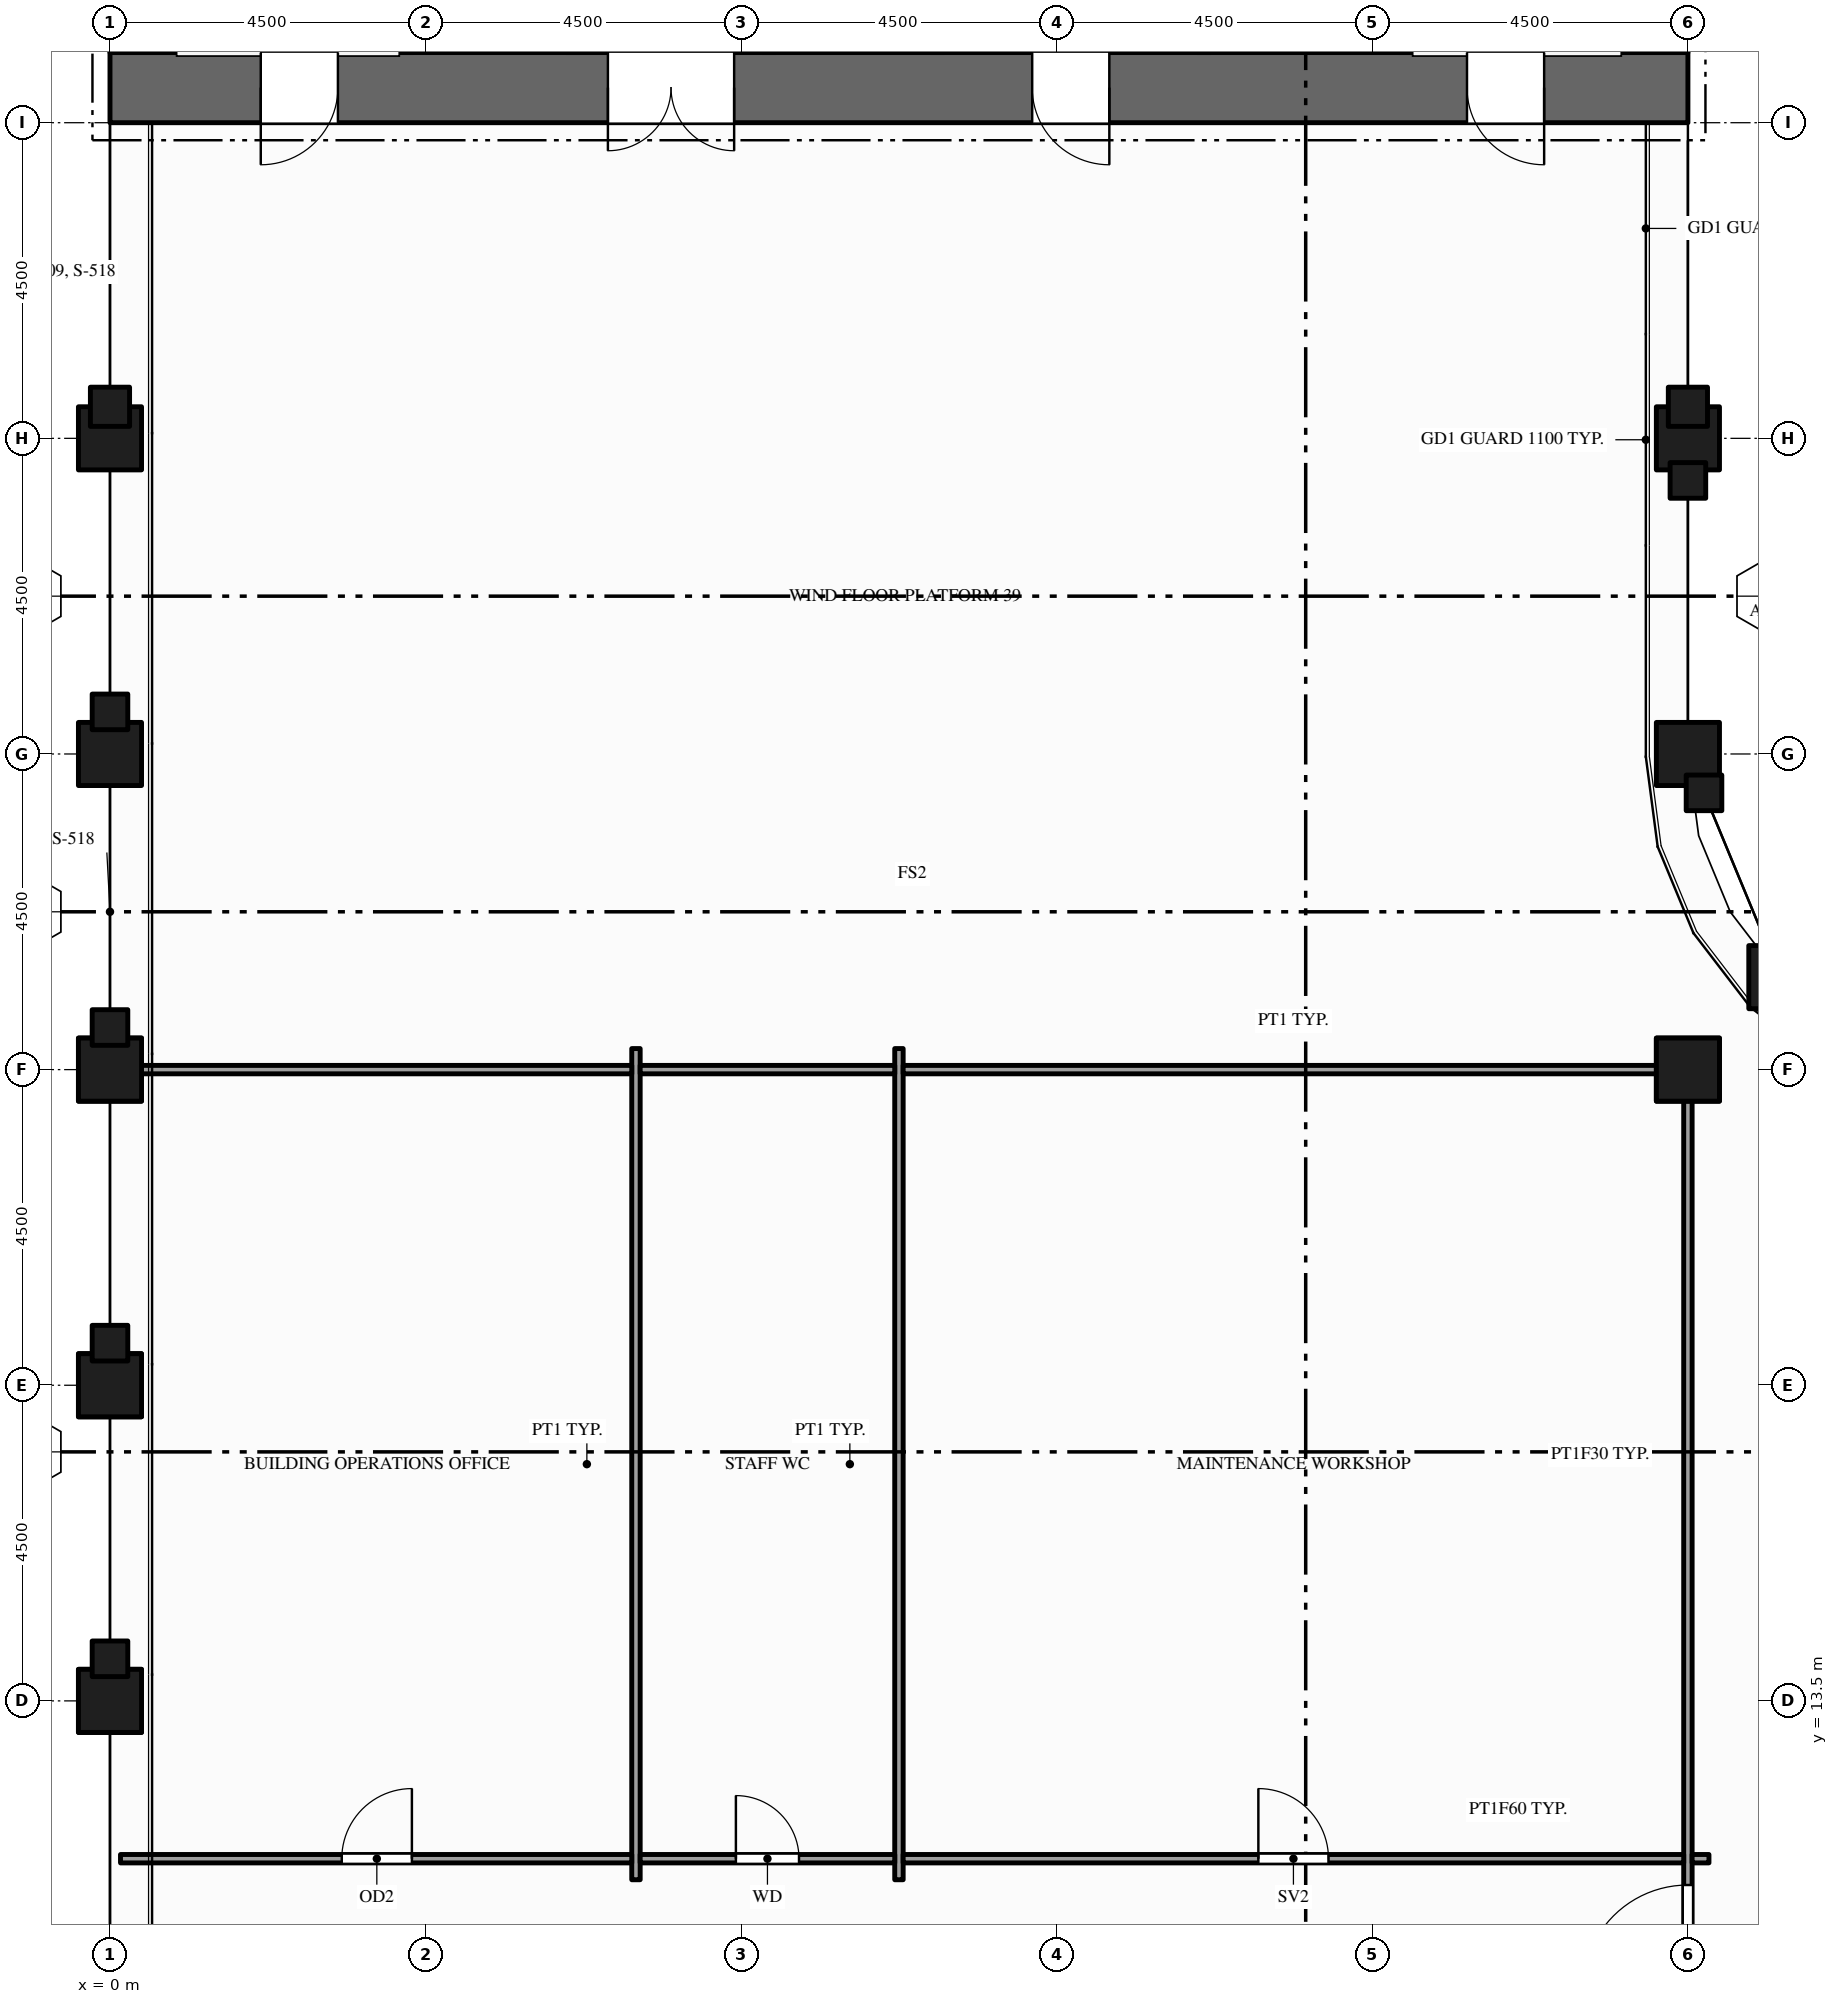
"""IFC4 building model, lengths in metres.
Left out: names, types, materials, properties, quantities, classifications, styles, units other than length and angle.
Written with IfcOpenShell. Run it as: python <this file> out.ifc"""

import sys

from ifc_helpers import new_model, si_unit, direction, frame, frame_2d, origin, origin_2d, place, context, subcontext, project, spatial, rectangle, hollow_rectangle, extrude, element, fill, save


model = new_model("IFC4")
c1 = context("Model", 3, precision=1e-05, world=origin(), true_north=direction((0.0, 1.0)))
c2 = subcontext(c1, "Body", "Model", "MODEL_VIEW")
j1 = project(units=[si_unit("LENGTHUNIT", "METRE"), si_unit("PLANEANGLEUNIT", "RADIAN")], contexts=[c1])
p1 = place(None, origin())
s1 = spatial("IfcSite", under=j1, at=p1, CompositionType="ELEMENT")
p2 = place(p1, origin())
s2 = spatial("IfcBuilding", under=s1, at=p2, CompositionType="ELEMENT")
p3 = place(p2, frame((0.0, 0.0, 187.0)))
s3 = spatial("IfcBuildingStorey", under=s2, at=p3, CompositionType="ELEMENT", Elevation=187.0)
p4 = place(p3, frame((0.0, 36.5, -0.15), z_axis=(0.0, 0.0, 1.0), x_axis=(1.0, 0.0, 0.0)))
e1 = element("IfcWall", 1, at=p4, inside=s3, PredefinedType="SHEAR", context=c2, shape_type="SweptSolid", body=[
    extrude(rectangle(XDim=22.5, YDim=1.0, at=frame_2d((11.25, 0.0))), origin(), (0.0, 0.0, 1.0), 8.0),
])
p5 = place(p4, frame((7.1, 0.0, 0.15)))
e2 = element("IfcOpeningElement", 2, at=p5, cuts=e1, PredefinedType="OPENING", context=c2, shape_type="SweptSolid", body=[
    extrude(rectangle(XDim=1.8, YDim=2.1, at=frame_2d((0.9, 1.05))), frame((0.0, 0.51, 0.0), z_axis=(0.0, -1.0, 0.0), x_axis=(1.0, 0.0, 0.0)), (0.0, 0.0, 1.0), 1.02),
])
p6 = place(p4, frame((13.15, 0.0, 0.15)))
e3 = element("IfcOpeningElement", 3, at=p6, cuts=e1, PredefinedType="OPENING", context=c2, shape_type="SweptSolid", body=[
    extrude(rectangle(XDim=1.1, YDim=2.1, at=frame_2d((0.55, 1.05))), frame((0.0, 0.51, 0.0), z_axis=(0.0, -1.0, 0.0), x_axis=(1.0, 0.0, 0.0)), (0.0, 0.0, 1.0), 1.02),
])
p7 = place(p4, frame((2.15, 0.0, 0.15)))
e4 = element("IfcOpeningElement", 4, at=p7, cuts=e1, PredefinedType="OPENING", context=c2, shape_type="SweptSolid", body=[
    extrude(rectangle(XDim=1.1, YDim=2.1, at=frame_2d((0.55, 1.05))), frame((0.0, 0.51, 0.0), z_axis=(0.0, -1.0, 0.0), x_axis=(1.0, 0.0, 0.0)), (0.0, 0.0, 1.0), 1.02),
])
p8 = place(p4, frame((19.35, 0.0, 0.15)))
e5 = element("IfcOpeningElement", 5, at=p8, cuts=e1, PredefinedType="OPENING", context=c2, shape_type="SweptSolid", body=[
    extrude(rectangle(XDim=1.1, YDim=2.1, at=frame_2d((0.55, 1.05))), frame((0.0, 0.51, 0.0), z_axis=(0.0, -1.0, 0.0), x_axis=(1.0, 0.0, 0.0)), (0.0, 0.0, 1.0), 1.02),
])
p9 = place(p3, frame((0.0, 13.5, -0.25), z_axis=(0.0, 0.0, 1.0), x_axis=(1.0, 0.0, 0.0)))
e6 = element("IfcColumn", 6, at=p9, inside=s3, PredefinedType="COLUMN", context=c2, shape_type="SweptSolid", body=[
    extrude(hollow_rectangle(XDim=0.9, YDim=0.9, WallThickness=0.045, at=origin_2d()), origin(), (0.0, 0.0, 1.0), 6.6),
])
p10 = place(p3, frame((0.0, 13.5, 6.35), z_axis=(0.0, 0.0, 1.0), x_axis=(1.0, 0.0, 0.0)))
e7 = element("IfcColumn", 7, at=p10, inside=s3, PredefinedType="COLUMN", context=c2, shape_type="SweptSolid", body=[
    extrude(rectangle(XDim=0.9, YDim=0.9, at=origin_2d()), origin(), (0.0, 0.0, 1.0), 1.5),
])
p11 = place(p3, frame((0.0, 18.0, -0.25), z_axis=(0.0, 0.0, 1.0), x_axis=(1.0, 0.0, 0.0)))
e8 = element("IfcColumn", 8, at=p11, inside=s3, PredefinedType="COLUMN", context=c2, shape_type="SweptSolid", body=[
    extrude(hollow_rectangle(XDim=0.9, YDim=0.9, WallThickness=0.045, at=origin_2d()), origin(), (0.0, 0.0, 1.0), 6.6),
])
p12 = place(p3, frame((0.0, 18.0, 6.35), z_axis=(0.0, 0.0, 1.0), x_axis=(1.0, 0.0, 0.0)))
e9 = element("IfcColumn", 9, at=p12, inside=s3, PredefinedType="COLUMN", context=c2, shape_type="SweptSolid", body=[
    extrude(rectangle(XDim=0.9, YDim=0.9, at=origin_2d()), origin(), (0.0, 0.0, 1.0), 1.5),
])
p13 = place(p3, frame((0.0, 22.5, -0.25), z_axis=(0.0, 0.0, 1.0), x_axis=(1.0, 0.0, 0.0)))
e10 = element("IfcColumn", 10, at=p13, inside=s3, PredefinedType="COLUMN", context=c2, shape_type="SweptSolid", body=[
    extrude(hollow_rectangle(XDim=0.9, YDim=0.9, WallThickness=0.045, at=origin_2d()), origin(), (0.0, 0.0, 1.0), 6.6),
])
p14 = place(p3, frame((0.0, 22.5, 6.35), z_axis=(0.0, 0.0, 1.0), x_axis=(1.0, 0.0, 0.0)))
e11 = element("IfcColumn", 11, at=p14, inside=s3, PredefinedType="COLUMN", context=c2, shape_type="SweptSolid", body=[
    extrude(rectangle(XDim=0.9, YDim=0.9, at=origin_2d()), origin(), (0.0, 0.0, 1.0), 1.5),
])
for number, where, z_axis, x_axis in (
    (12, (0.0, 27.0, -0.25), (0.0, 0.0, 1.0), (1.0, 0.0, 0.0)),
    (13, (0.0, 31.5, -0.25), (0.0, 0.0, 1.0), (1.0, 0.0, 0.0)),
):
    element("IfcColumn", number, at=place(p3, frame(where, z_axis=z_axis, x_axis=x_axis)), inside=s3, PredefinedType="COLUMN", context=c2, shape_type="SweptSolid", body=[
        extrude(hollow_rectangle(XDim=0.9, YDim=0.9, WallThickness=0.045, at=origin_2d()), origin(), (0.0, 0.0, 1.0), 8.1),
    ])
p15 = place(p3, frame((22.5, 22.5, -0.25), z_axis=(0.0, 0.0, 1.0), x_axis=(1.0, 0.0, 0.0)))
e14 = element("IfcColumn", 14, at=p15, inside=s3, PredefinedType="COLUMN", context=c2, shape_type="SweptSolid", body=[
    extrude(hollow_rectangle(XDim=0.9, YDim=0.9, WallThickness=0.045, at=origin_2d()), origin(), (0.0, 0.0, 1.0), 6.6),
])
p16 = place(p3, frame((22.5, 22.5, 6.35), z_axis=(0.0, 0.0, 1.0), x_axis=(1.0, 0.0, 0.0)))
e15 = element("IfcColumn", 15, at=p16, inside=s3, PredefinedType="COLUMN", context=c2, shape_type="SweptSolid", body=[
    extrude(rectangle(XDim=0.9, YDim=0.9, at=origin_2d()), origin(), (0.0, 0.0, 1.0), 1.5),
])
for number, where, z_axis, x_axis in (
    (16, (22.5, 27.0, -0.25), (0.0, 0.0, 1.0), (1.0, 0.0, 0.0)),
    (17, (22.5, 31.5, -0.25), (0.0, 0.0, 1.0), (1.0, 0.0, 0.0)),
    (18, (23.818, 23.818, -0.25), (0.0, 0.0, 1.0), (1.0, 0.0, 0.0)),
):
    element("IfcColumn", number, at=place(p3, frame(where, z_axis=z_axis, x_axis=x_axis)), inside=s3, PredefinedType="COLUMN", context=c2, shape_type="SweptSolid", body=[
        extrude(hollow_rectangle(XDim=0.9, YDim=0.9, WallThickness=0.045, at=origin_2d()), origin(), (0.0, 0.0, 1.0), 8.1),
    ])
for number, where, z_axis, x_axis in (
    (19, (7.5, 10.95, 0.0), (0.0, 0.0, 1.0), (0.0, 1.0, 0.0)),
    (20, (11.25, 10.95, 0.0), (0.0, 0.0, 1.0), (0.0, 1.0, 0.0)),
):
    element("IfcWall", number, at=place(p3, frame(where, z_axis=z_axis, x_axis=x_axis)), inside=s3, PredefinedType="PARTITIONING", context=c2, shape_type="SweptSolid", body=[
        extrude(rectangle(XDim=11.85, YDim=0.12, at=frame_2d((5.925, 0.0))), origin(), (0.0, 0.0, 1.0), 6.6),
    ])
p17 = place(p3, frame((22.5, 0.15, 0.0), z_axis=(0.0, 0.0, 1.0), x_axis=(0.0, 1.0, 0.0)))
e21 = element("IfcWall", 21, at=p17, inside=s3, PredefinedType="PARTITIONING", context=c2, shape_type="SweptSolid", body=[
    extrude(rectangle(XDim=22.65, YDim=0.12, at=frame_2d((11.325, 0.0))), origin(), (0.0, 0.0, 1.0), 6.87),
])
p18 = place(p17, frame((9.225, 0.0, 0.0)))
e22 = element("IfcOpeningElement", 22, at=p18, cuts=e21, PredefinedType="OPENING", context=c2, shape_type="SweptSolid", body=[
    extrude(rectangle(XDim=1.5, YDim=2.1, at=frame_2d((0.75, 1.05))), frame((0.0, 0.07, 0.0), z_axis=(0.0, -1.0, 0.0), x_axis=(1.0, 0.0, 0.0)), (0.0, 0.0, 1.0), 0.14),
])
p19 = place(p3, frame((0.15, 11.25, 0.0), z_axis=(0.0, 0.0, 1.0), x_axis=(1.0, 0.0, 0.0)))
e23 = element("IfcWall", 23, at=p19, inside=s3, PredefinedType="PARTITIONING", context=c2, shape_type="SweptSolid", body=[
    extrude(rectangle(XDim=7.29, YDim=0.12, at=frame_2d((3.645, 0.0))), origin(), (0.0, 0.0, 1.0), 6.87),
])
p20 = place(p19, frame((3.155, 0.0, 0.0)))
e24 = element("IfcOpeningElement", 24, at=p20, cuts=e23, PredefinedType="OPENING", context=c2, shape_type="SweptSolid", body=[
    extrude(rectangle(XDim=1.0, YDim=2.1, at=frame_2d((0.5, 1.05))), frame((0.0, 0.07, 0.0), z_axis=(0.0, -1.0, 0.0), x_axis=(1.0, 0.0, 0.0)), (0.0, 0.0, 1.0), 0.14),
])
p21 = place(p3, frame((7.56, 11.25, 0.0), z_axis=(0.0, 0.0, 1.0), x_axis=(1.0, 0.0, 0.0)))
e25 = element("IfcWall", 25, at=p21, inside=s3, PredefinedType="PARTITIONING", context=c2, shape_type="SweptSolid", body=[
    extrude(rectangle(XDim=3.63, YDim=0.12, at=frame_2d((1.815, 0.0))), origin(), (0.0, 0.0, 1.0), 6.87),
])
p22 = place(p21, frame((1.365, 0.0, 0.0)))
e26 = element("IfcOpeningElement", 26, at=p22, cuts=e25, PredefinedType="OPENING", context=c2, shape_type="SweptSolid", body=[
    extrude(rectangle(XDim=0.9, YDim=2.1, at=frame_2d((0.45, 1.05))), frame((0.0, 0.07, 0.0), z_axis=(0.0, -1.0, 0.0), x_axis=(1.0, 0.0, 0.0)), (0.0, 0.0, 1.0), 0.14),
])
p23 = place(p3, frame((11.31, 11.25, 0.0), z_axis=(0.0, 0.0, 1.0), x_axis=(1.0, 0.0, 0.0)))
e27 = element("IfcWall", 27, at=p23, inside=s3, PredefinedType="PARTITIONING", context=c2, shape_type="SweptSolid", body=[
    extrude(rectangle(XDim=11.13, YDim=0.12, at=frame_2d((5.565, 0.0))), origin(), (0.0, 0.0, 1.0), 6.87),
])
p24 = place(p23, frame((5.065, 0.0, 0.0)))
e28 = element("IfcOpeningElement", 28, at=p24, cuts=e27, PredefinedType="OPENING", context=c2, shape_type="SweptSolid", body=[
    extrude(rectangle(XDim=1.0, YDim=2.1, at=frame_2d((0.5, 1.05))), frame((0.0, 0.07, 0.0), z_axis=(0.0, -1.0, 0.0), x_axis=(1.0, 0.0, 0.0)), (0.0, 0.0, 1.0), 0.14),
])
p25 = place(p3, frame((22.56, 11.25, 0.0), z_axis=(0.0, 0.0, 1.0), x_axis=(1.0, 0.0, 0.0)))
e29 = element("IfcWall", 29, at=p25, inside=s3, PredefinedType="PARTITIONING", context=c2, shape_type="SweptSolid", body=[
    extrude(rectangle(XDim=0.24, YDim=0.12, at=frame_2d((0.12, 0.0))), origin(), (0.0, 0.0, 1.0), 6.87),
])
p26 = place(p3, frame((0.15, 22.5, 0.0), z_axis=(0.0, 0.0, 1.0), x_axis=(1.0, 0.0, 0.0)))
e30 = element("IfcWall", 30, at=p26, inside=s3, PredefinedType="PARTITIONING", context=c2, shape_type="SweptSolid", body=[
    extrude(rectangle(XDim=7.29, YDim=0.12, at=frame_2d((3.645, 0.0))), origin(), (0.0, 0.0, 1.0), 6.45),
])
p27 = place(p3, frame((7.56, 22.5, 0.0), z_axis=(0.0, 0.0, 1.0), x_axis=(1.0, 0.0, 0.0)))
e31 = element("IfcWall", 31, at=p27, inside=s3, PredefinedType="PARTITIONING", context=c2, shape_type="SweptSolid", body=[
    extrude(rectangle(XDim=3.63, YDim=0.12, at=frame_2d((1.815, 0.0))), origin(), (0.0, 0.0, 1.0), 6.6),
])
p28 = place(p3, frame((11.31, 22.5, 0.0), z_axis=(0.0, 0.0, 1.0), x_axis=(1.0, 0.0, 0.0)))
e32 = element("IfcWall", 32, at=p28, inside=s3, PredefinedType="PARTITIONING", context=c2, shape_type="SweptSolid", body=[
    extrude(rectangle(XDim=11.13, YDim=0.12, at=frame_2d((5.565, 0.0))), origin(), (0.0, 0.0, 1.0), 6.6),
])
p29 = place(p3, frame((22.56, 22.5, 0.0), z_axis=(0.0, 0.0, 1.0), x_axis=(1.0, 0.0, 0.0)))
e33 = element("IfcWall", 33, at=p29, inside=s3, PredefinedType="PARTITIONING", context=c2, shape_type="SweptSolid", body=[
    extrude(rectangle(XDim=0.24, YDim=0.12, at=frame_2d((0.12, 0.0))), origin(), (0.0, 0.0, 1.0), 7.85),
])
p30 = place(p5, origin())
e34 = element("IfcDoor", 34, at=p30, inside=s3, OperationType="DOUBLE_DOOR_SINGLE_SWING", PredefinedType="DOOR", context=c2, shape_type="SweptSolid", body=[
    extrude(rectangle(XDim=1.8, YDim=2.1, at=frame_2d((0.9, 1.05))), frame((0.0, 0.025, 0.0), z_axis=(0.0, -1.0, 0.0), x_axis=(1.0, 0.0, 0.0)), (0.0, 0.0, 1.0), 0.05),
])
fill(e2, e34)
p31 = place(p6, origin())
e35 = element("IfcDoor", 35, at=p31, inside=s3, OperationType="SINGLE_SWING_RIGHT", PredefinedType="DOOR", context=c2, shape_type="SweptSolid", body=[
    extrude(rectangle(XDim=1.1, YDim=2.1, at=frame_2d((0.55, 1.05))), frame((0.0, 0.025, 0.0), z_axis=(0.0, -1.0, 0.0), x_axis=(1.0, 0.0, 0.0)), (0.0, 0.0, 1.0), 0.05),
])
fill(e3, e35)
p32 = place(p7, origin())
e36 = element("IfcDoor", 36, at=p32, inside=s3, OperationType="SINGLE_SWING_LEFT", PredefinedType="DOOR", context=c2, shape_type="SweptSolid", body=[
    extrude(rectangle(XDim=1.1, YDim=2.1, at=frame_2d((0.55, 1.05))), frame((0.0, 0.025, 0.0), z_axis=(0.0, -1.0, 0.0), x_axis=(1.0, 0.0, 0.0)), (0.0, 0.0, 1.0), 0.05),
])
fill(e4, e36)
p33 = place(p8, origin())
e37 = element("IfcDoor", 37, at=p33, inside=s3, OperationType="SINGLE_SWING_RIGHT", PredefinedType="DOOR", context=c2, shape_type="SweptSolid", body=[
    extrude(rectangle(XDim=1.1, YDim=2.1, at=frame_2d((0.55, 1.05))), frame((0.0, 0.025, 0.0), z_axis=(0.0, -1.0, 0.0), x_axis=(1.0, 0.0, 0.0)), (0.0, 0.0, 1.0), 0.05),
])
fill(e5, e37)
p34 = place(p22, origin())
e38 = element("IfcDoor", 38, at=p34, inside=s3, OperationType="SINGLE_SWING_LEFT", PredefinedType="DOOR", context=c2, shape_type="SweptSolid", body=[
    extrude(rectangle(XDim=0.9, YDim=2.1, at=frame_2d((0.45, 1.05))), frame((0.0, 0.025, 0.0), z_axis=(0.0, -1.0, 0.0), x_axis=(1.0, 0.0, 0.0)), (0.0, 0.0, 1.0), 0.05),
])
fill(e26, e38)
p35 = place(p20, origin())
e39 = element("IfcDoor", 39, at=p35, inside=s3, OperationType="SINGLE_SWING_RIGHT", PredefinedType="DOOR", context=c2, shape_type="SweptSolid", body=[
    extrude(rectangle(XDim=1.0, YDim=2.1, at=frame_2d((0.5, 1.05))), frame((0.0, 0.025, 0.0), z_axis=(0.0, -1.0, 0.0), x_axis=(1.0, 0.0, 0.0)), (0.0, 0.0, 1.0), 0.05),
])
fill(e24, e39)
p36 = place(p24, origin())
e40 = element("IfcDoor", 40, at=p36, inside=s3, OperationType="SINGLE_SWING_LEFT", PredefinedType="DOOR", context=c2, shape_type="SweptSolid", body=[
    extrude(rectangle(XDim=1.0, YDim=2.1, at=frame_2d((0.5, 1.05))), frame((0.0, 0.025, 0.0), z_axis=(0.0, -1.0, 0.0), x_axis=(1.0, 0.0, 0.0)), (0.0, 0.0, 1.0), 0.05),
])
fill(e28, e40)
p37 = place(p18, origin())
e41 = element("IfcDoor", 41, at=p37, inside=s3, OperationType="SINGLE_SWING_LEFT", PredefinedType="DOOR", context=c2, shape_type="SweptSolid", body=[
    extrude(rectangle(XDim=1.5, YDim=2.1, at=frame_2d((0.75, 1.05))), frame((0.0, 0.025, 0.0), z_axis=(0.0, -1.0, 0.0), x_axis=(1.0, 0.0, 0.0)), (0.0, 0.0, 1.0), 0.05),
])
fill(e22, e41)
save(model, sys.argv[1])
